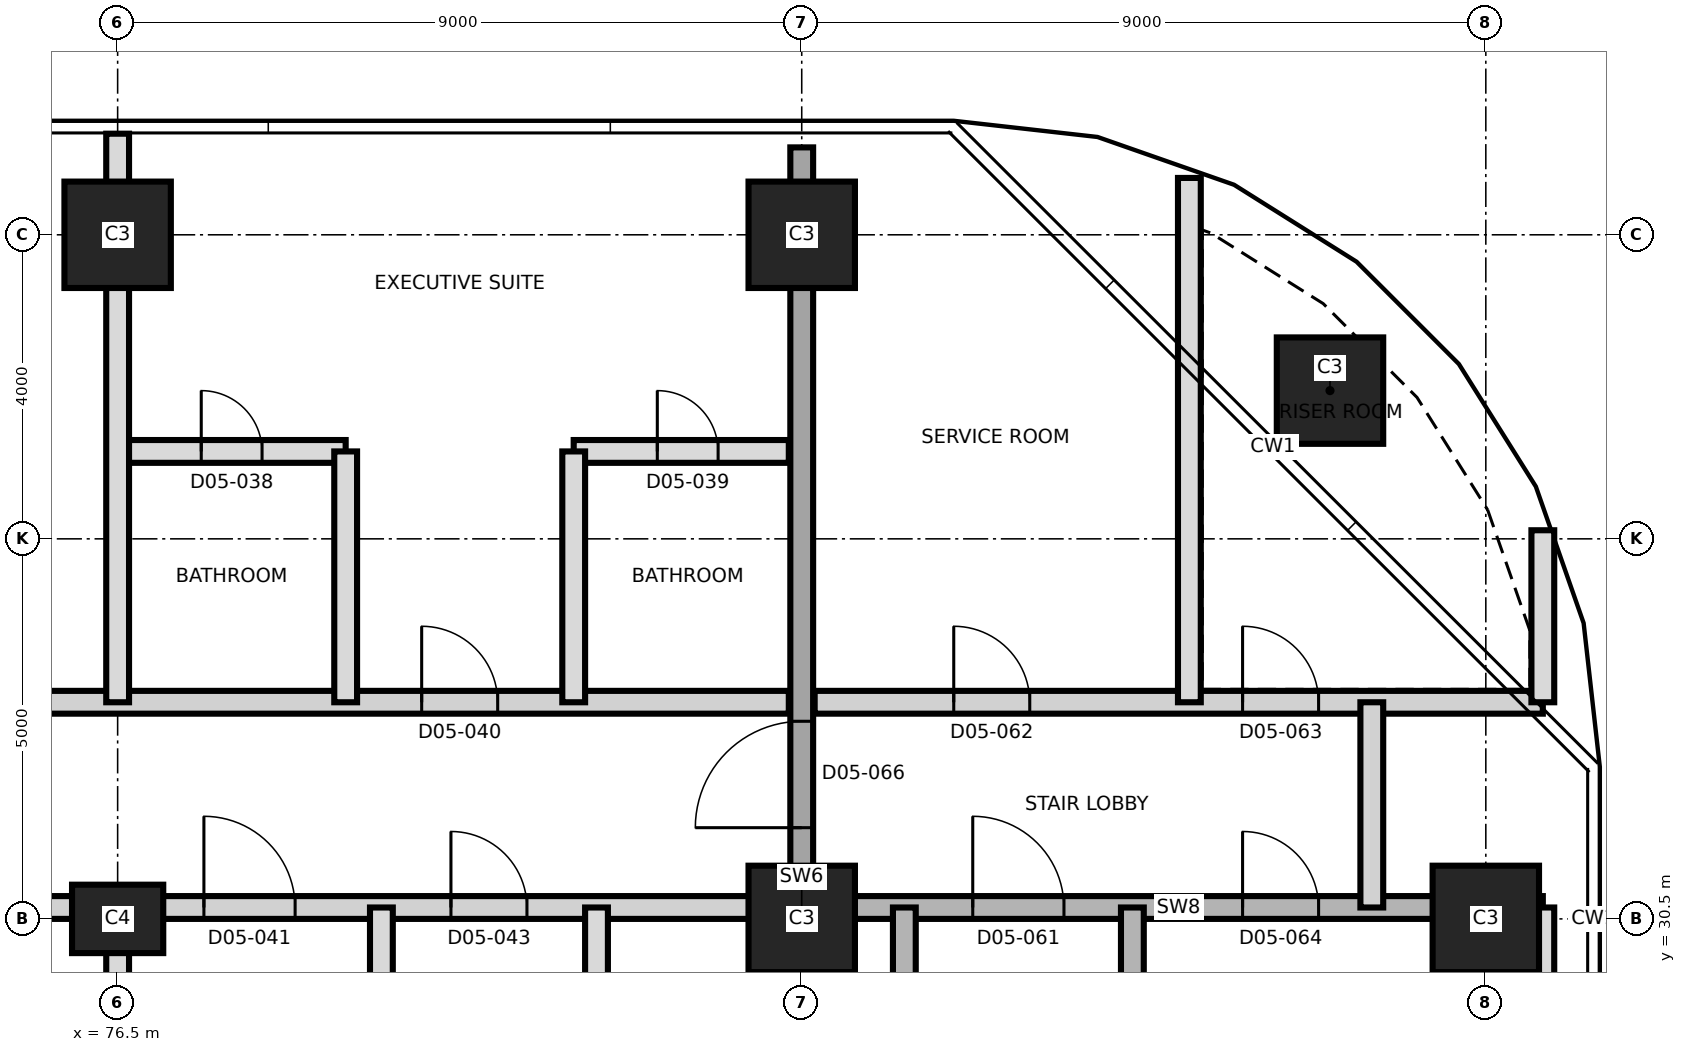
"""IFC4 building model, lengths in metres.
Left out: names, types, materials, properties, quantities, classifications, styles, units other than length and angle.
Written with IfcOpenShell. Run it as: python <this file> out.ifc"""

import sys

from ifc_helpers import new_model, si_unit, direction, frame, frame_2d, origin, origin_2d, place, context, subcontext, project, spatial, rectangle, extrude, element, fill, save


model = new_model("IFC4")
c1 = context("Model", 3, precision=1e-05, world=origin(), true_north=direction((0.0, 1.0)))
c2 = subcontext(c1, "Body", "Model", "MODEL_VIEW")
j1 = project(units=[si_unit("LENGTHUNIT", "METRE"), si_unit("PLANEANGLEUNIT", "RADIAN")], contexts=[c1])
p1 = place(None, origin())
s1 = spatial("IfcSite", under=j1, at=p1, CompositionType="ELEMENT")
p2 = place(p1, origin())
s2 = spatial("IfcBuilding", under=s1, at=p2, CompositionType="ELEMENT")
p3 = place(p2, frame((0.0, 0.0, 70.5)))
s3 = spatial("IfcBuildingStorey", under=s2, at=p3, CompositionType="ELEMENT", Elevation=70.5)
p4 = place(p3, frame((76.5, 30.5, 0.0), z_axis=(0.0, 0.0, 1.0), x_axis=(1.0, 0.0, 0.0)))
e1 = element("IfcColumn", 1, at=p4, inside=s3, PredefinedType="COLUMN", context=c2, shape_type="SweptSolid", body=[
    extrude(rectangle(XDim=1.2, YDim=0.9, at=origin_2d()), origin(), (0.0, 0.0, 1.0), 3.7),
])
for number, where, z_axis, x_axis in (
    (2, (85.5, 30.5, 0.0), (0.0, 0.0, 1.0), (1.0, 0.0, 0.0)),
    (3, (94.5, 30.5, 0.0), (0.0, 0.0, 1.0), (1.0, 0.0, 0.0)),
    (4, (92.45, 37.45, 0.0), (0.0, 0.0, 1.0), (1.0, 0.0, 0.0)),
    (5, (76.5, 39.5, 0.0), (0.0, 0.0, 1.0), (1.0, 0.0, 0.0)),
    (6, (85.5, 39.5, 0.0), (0.0, 0.0, 1.0), (1.0, 0.0, 0.0)),
):
    element("IfcColumn", number, at=place(p3, frame(where, z_axis=z_axis, x_axis=x_axis)), inside=s3, PredefinedType="COLUMN", context=c2, shape_type="SweptSolid", body=[
        extrude(rectangle(XDim=1.4, YDim=1.4, at=origin_2d()), origin(), (0.0, 0.0, 1.0), 3.7),
    ])
p5 = place(p3, frame((85.5, 20.35, 0.0), z_axis=(0.0, 0.0, 1.0), x_axis=(0.0, 1.0, 0.0)))
e7 = element("IfcWall", 7, at=p5, inside=s3, PredefinedType="SHEAR", context=c2, shape_type="SweptSolid", body=[
    extrude(rectangle(XDim=20.3, YDim=0.3, at=frame_2d((10.15, 0.0))), origin(), (0.0, 0.0, 1.0), 3.7),
])
p6 = place(p5, frame((11.35, 0.0, 0.0)))
e8 = element("IfcOpeningElement", 8, at=p6, cuts=e7, PredefinedType="OPENING", context=c2, shape_type="SweptSolid", body=[
    extrude(rectangle(XDim=1.4, YDim=2.1, at=frame_2d((0.7, 1.05))), frame((0.0, 0.16, 0.0), z_axis=(0.0, -1.0, 0.0), x_axis=(1.0, 0.0, 0.0)), (0.0, 0.0, 1.0), 0.32),
])
p7 = place(p3, frame((58.95, 30.65, 0.0), z_axis=(0.0, 0.0, 1.0), x_axis=(1.0, 0.0, 0.0)))
e9 = element("IfcWall", 9, at=p7, inside=s3, PredefinedType="PARTITIONING", context=c2, shape_type="SweptSolid", body=[
    extrude(rectangle(XDim=26.38, YDim=0.3, at=frame_2d((13.19, 0.0))), origin(), (0.0, 0.0, 1.0), 3.4),
])
p8 = place(p7, frame((0.685, 0.0, 0.0)))
e10 = element("IfcOpeningElement", 10, at=p8, cuts=e9, PredefinedType="OPENING", context=c2, shape_type="SweptSolid", body=[
    extrude(rectangle(XDim=1.2, YDim=2.1, at=frame_2d((0.6, 1.05))), frame((0.0, 0.16, 0.0), z_axis=(0.0, -1.0, 0.0), x_axis=(1.0, 0.0, 0.0)), (0.0, 0.0, 1.0), 0.32),
])
p9 = place(p7, frame((3.935, 0.0, 0.0)))
e11 = element("IfcOpeningElement", 11, at=p9, cuts=e9, PredefinedType="OPENING", context=c2, shape_type="SweptSolid", body=[
    extrude(rectangle(XDim=1.0, YDim=2.1, at=frame_2d((0.5, 1.05))), frame((0.0, 0.16, 0.0), z_axis=(0.0, -1.0, 0.0), x_axis=(1.0, 0.0, 0.0)), (0.0, 0.0, 1.0), 0.32),
])
p10 = place(p7, frame((11.965, 0.0, 0.0)))
e12 = element("IfcOpeningElement", 12, at=p10, cuts=e9, PredefinedType="OPENING", context=c2, shape_type="SweptSolid", body=[
    extrude(rectangle(XDim=1.0, YDim=2.1, at=frame_2d((0.5, 1.05))), frame((0.0, 0.16, 0.0), z_axis=(0.0, -1.0, 0.0), x_axis=(1.0, 0.0, 0.0)), (0.0, 0.0, 1.0), 0.32),
])
p11 = place(p7, frame((14.915, 0.0, 0.0)))
e13 = element("IfcOpeningElement", 13, at=p11, cuts=e9, PredefinedType="OPENING", context=c2, shape_type="SweptSolid", body=[
    extrude(rectangle(XDim=1.4, YDim=2.1, at=frame_2d((0.7, 1.05))), frame((0.0, 0.16, 0.0), z_axis=(0.0, -1.0, 0.0), x_axis=(1.0, 0.0, 0.0)), (0.0, 0.0, 1.0), 0.32),
])
p12 = place(p7, frame((18.685, 0.0, 0.0)))
e14 = element("IfcOpeningElement", 14, at=p12, cuts=e9, PredefinedType="OPENING", context=c2, shape_type="SweptSolid", body=[
    extrude(rectangle(XDim=1.2, YDim=2.1, at=frame_2d((0.6, 1.05))), frame((0.0, 0.16, 0.0), z_axis=(0.0, -1.0, 0.0), x_axis=(1.0, 0.0, 0.0)), (0.0, 0.0, 1.0), 0.32),
])
p13 = place(p7, frame((21.935, 0.0, 0.0)))
e15 = element("IfcOpeningElement", 15, at=p13, cuts=e9, PredefinedType="OPENING", context=c2, shape_type="SweptSolid", body=[
    extrude(rectangle(XDim=1.0, YDim=2.1, at=frame_2d((0.5, 1.05))), frame((0.0, 0.16, 0.0), z_axis=(0.0, -1.0, 0.0), x_axis=(1.0, 0.0, 0.0)), (0.0, 0.0, 1.0), 0.32),
])
p14 = place(p3, frame((85.67, 30.65, 0.0), z_axis=(0.0, 0.0, 1.0), x_axis=(1.0, 0.0, 0.0)))
e16 = element("IfcWall", 16, at=p14, inside=s3, PredefinedType="SHEAR", context=c2, shape_type="SweptSolid", body=[
    extrude(rectangle(XDim=9.58, YDim=0.3, at=frame_2d((4.79, 0.0))), origin(), (0.0, 0.0, 1.0), 3.4),
])
p15 = place(p14, frame((2.08, 0.0, 0.0)))
e17 = element("IfcOpeningElement", 17, at=p15, cuts=e16, PredefinedType="OPENING", context=c2, shape_type="SweptSolid", body=[
    extrude(rectangle(XDim=1.2, YDim=2.1, at=frame_2d((0.6, 1.05))), frame((0.0, 0.16, 0.0), z_axis=(0.0, -1.0, 0.0), x_axis=(1.0, 0.0, 0.0)), (0.0, 0.0, 1.0), 0.32),
])
p16 = place(p14, frame((5.63, 0.0, 0.0)))
e18 = element("IfcOpeningElement", 18, at=p16, cuts=e16, PredefinedType="OPENING", context=c2, shape_type="SweptSolid", body=[
    extrude(rectangle(XDim=1.0, YDim=2.1, at=frame_2d((0.5, 1.05))), frame((0.0, 0.16, 0.0), z_axis=(0.0, -1.0, 0.0), x_axis=(1.0, 0.0, 0.0)), (0.0, 0.0, 1.0), 0.32),
])
p17 = place(p3, frame((58.95, 33.35, 0.0), z_axis=(0.0, 0.0, 1.0), x_axis=(1.0, 0.0, 0.0)))
e19 = element("IfcWall", 19, at=p17, inside=s3, PredefinedType="PARTITIONING", context=c2, shape_type="SweptSolid", body=[
    extrude(rectangle(XDim=26.38, YDim=0.3, at=frame_2d((13.19, 0.0))), origin(), (0.0, 0.0, 1.0), 3.4),
])
p18 = place(p17, frame((0.685, 0.0, 0.0)))
e20 = element("IfcOpeningElement", 20, at=p18, cuts=e19, PredefinedType="OPENING", context=c2, shape_type="SweptSolid", body=[
    extrude(rectangle(XDim=1.2, YDim=2.1, at=frame_2d((0.6, 1.05))), frame((0.0, 0.16, 0.0), z_axis=(0.0, -1.0, 0.0), x_axis=(1.0, 0.0, 0.0)), (0.0, 0.0, 1.0), 0.32),
])
p19 = place(p17, frame((3.935, 0.0, 0.0)))
e21 = element("IfcOpeningElement", 21, at=p19, cuts=e19, PredefinedType="OPENING", context=c2, shape_type="SweptSolid", body=[
    extrude(rectangle(XDim=1.0, YDim=2.1, at=frame_2d((0.5, 1.05))), frame((0.0, 0.16, 0.0), z_axis=(0.0, -1.0, 0.0), x_axis=(1.0, 0.0, 0.0)), (0.0, 0.0, 1.0), 0.32),
])
p20 = place(p17, frame((9.58, 0.0, 0.0)))
e22 = element("IfcOpeningElement", 22, at=p20, cuts=e19, PredefinedType="OPENING", context=c2, shape_type="SweptSolid", body=[
    extrude(rectangle(XDim=1.0, YDim=2.1, at=frame_2d((0.5, 1.05))), frame((0.0, 0.16, 0.0), z_axis=(0.0, -1.0, 0.0), x_axis=(1.0, 0.0, 0.0)), (0.0, 0.0, 1.0), 0.32),
])
p21 = place(p17, frame((15.43, 0.0, 0.0)))
e23 = element("IfcOpeningElement", 23, at=p21, cuts=e19, PredefinedType="OPENING", context=c2, shape_type="SweptSolid", body=[
    extrude(rectangle(XDim=1.0, YDim=2.1, at=frame_2d((0.5, 1.05))), frame((0.0, 0.16, 0.0), z_axis=(0.0, -1.0, 0.0), x_axis=(1.0, 0.0, 0.0)), (0.0, 0.0, 1.0), 0.32),
])
p22 = place(p17, frame((21.55, 0.0, 0.0)))
e24 = element("IfcOpeningElement", 24, at=p22, cuts=e19, PredefinedType="OPENING", context=c2, shape_type="SweptSolid", body=[
    extrude(rectangle(XDim=1.0, YDim=2.4, at=frame_2d((0.5, 1.2))), frame((0.0, 0.16, 0.0), z_axis=(0.0, -1.0, 0.0), x_axis=(1.0, 0.0, 0.0)), (0.0, 0.0, 1.0), 0.32),
])
p23 = place(p3, frame((85.67, 33.35, 0.0), z_axis=(0.0, 0.0, 1.0), x_axis=(1.0, 0.0, 0.0)))
e25 = element("IfcWall", 25, at=p23, inside=s3, PredefinedType="PARTITIONING", context=c2, shape_type="SweptSolid", body=[
    extrude(rectangle(XDim=9.58, YDim=0.3, at=frame_2d((4.79, 0.0))), origin(), (0.0, 0.0, 1.0), 3.4),
])
p24 = place(p23, frame((1.83, 0.0, 0.0)))
e26 = element("IfcOpeningElement", 26, at=p24, cuts=e25, PredefinedType="OPENING", context=c2, shape_type="SweptSolid", body=[
    extrude(rectangle(XDim=1.0, YDim=2.1, at=frame_2d((0.5, 1.05))), frame((0.0, 0.16, 0.0), z_axis=(0.0, -1.0, 0.0), x_axis=(1.0, 0.0, 0.0)), (0.0, 0.0, 1.0), 0.32),
])
p25 = place(p23, frame((5.63, 0.0, 0.0)))
e27 = element("IfcOpeningElement", 27, at=p25, cuts=e25, PredefinedType="OPENING", context=c2, shape_type="SweptSolid", body=[
    extrude(rectangle(XDim=1.0, YDim=2.1, at=frame_2d((0.5, 1.05))), frame((0.0, 0.16, 0.0), z_axis=(0.0, -1.0, 0.0), x_axis=(1.0, 0.0, 0.0)), (0.0, 0.0, 1.0), 0.32),
])
p26 = place(p3, frame((76.5, 36.65, 0.0), z_axis=(0.0, 0.0, 1.0), x_axis=(1.0, 0.0, 0.0)))
e28 = element("IfcWall", 28, at=p26, inside=s3, PredefinedType="PARTITIONING", context=c2, shape_type="SweptSolid", body=[
    extrude(rectangle(XDim=3.0, YDim=0.3, at=frame_2d((1.5, 0.0))), origin(), (0.0, 0.0, 1.0), 3.4),
])
p27 = place(p26, frame((1.1, 0.0, 0.0)))
e29 = element("IfcOpeningElement", 29, at=p27, cuts=e28, PredefinedType="OPENING", context=c2, shape_type="SweptSolid", body=[
    extrude(rectangle(XDim=0.8, YDim=2.1, at=frame_2d((0.4, 1.05))), frame((0.0, 0.16, 0.0), z_axis=(0.0, -1.0, 0.0), x_axis=(1.0, 0.0, 0.0)), (0.0, 0.0, 1.0), 0.32),
])
p28 = place(p3, frame((82.5, 36.65, 0.0), z_axis=(0.0, 0.0, 1.0), x_axis=(1.0, 0.0, 0.0)))
e30 = element("IfcWall", 30, at=p28, inside=s3, PredefinedType="PARTITIONING", context=c2, shape_type="SweptSolid", body=[
    extrude(rectangle(XDim=2.83, YDim=0.3, at=frame_2d((1.415, 0.0))), origin(), (0.0, 0.0, 1.0), 3.4),
])
p29 = place(p28, frame((1.1, 0.0, 0.0)))
e31 = element("IfcOpeningElement", 31, at=p29, cuts=e30, PredefinedType="OPENING", context=c2, shape_type="SweptSolid", body=[
    extrude(rectangle(XDim=0.8, YDim=2.1, at=frame_2d((0.4, 1.05))), frame((0.0, 0.16, 0.0), z_axis=(0.0, -1.0, 0.0), x_axis=(1.0, 0.0, 0.0)), (0.0, 0.0, 1.0), 0.32),
])
p30 = place(p3, frame((76.5, 20.35, 0.0), z_axis=(0.0, 0.0, 1.0), x_axis=(0.0, 1.0, 0.0)))
e32 = element("IfcWall", 32, at=p30, inside=s3, PredefinedType="PARTITIONING", context=c2, shape_type="SweptSolid", body=[
    extrude(rectangle(XDim=10.3, YDim=0.3, at=frame_2d((5.15, 0.0))), origin(), (0.0, 0.0, 1.0), 3.4),
])
p31 = place(p3, frame((76.5, 33.35, 0.0), z_axis=(0.0, 0.0, 1.0), x_axis=(0.0, 1.0, 0.0)))
e33 = element("IfcWall", 33, at=p31, inside=s3, PredefinedType="PARTITIONING", context=c2, shape_type="SweptSolid", body=[
    extrude(rectangle(XDim=7.48, YDim=0.3, at=frame_2d((3.74, 0.0))), origin(), (0.0, 0.0, 1.0), 3.4),
])
p32 = place(p3, frame((79.5, 33.35, 0.0), z_axis=(0.0, 0.0, 1.0), x_axis=(0.0, 1.0, 0.0)))
e34 = element("IfcWall", 34, at=p32, inside=s3, PredefinedType="PARTITIONING", context=c2, shape_type="SweptSolid", body=[
    extrude(rectangle(XDim=3.3, YDim=0.3, at=frame_2d((1.65, 0.0))), origin(), (0.0, 0.0, 1.0), 3.4),
])
p33 = place(p3, frame((79.97, 20.35, 0.0), z_axis=(0.0, 0.0, 1.0), x_axis=(0.0, 1.0, 0.0)))
e35 = element("IfcWall", 35, at=p33, inside=s3, PredefinedType="PARTITIONING", context=c2, shape_type="SweptSolid", body=[
    extrude(rectangle(XDim=10.3, YDim=0.3, at=frame_2d((5.15, 0.0))), origin(), (0.0, 0.0, 1.0), 3.4),
])
p34 = place(p3, frame((82.5, 33.35, 0.0), z_axis=(0.0, 0.0, 1.0), x_axis=(0.0, 1.0, 0.0)))
e36 = element("IfcWall", 36, at=p34, inside=s3, PredefinedType="PARTITIONING", context=c2, shape_type="SweptSolid", body=[
    extrude(rectangle(XDim=3.3, YDim=0.3, at=frame_2d((1.65, 0.0))), origin(), (0.0, 0.0, 1.0), 3.4),
])
p35 = place(p3, frame((82.8, 27.45, 0.0), z_axis=(0.0, 0.0, 1.0), x_axis=(0.0, 1.0, 0.0)))
e37 = element("IfcWall", 37, at=p35, inside=s3, PredefinedType="PARTITIONING", context=c2, shape_type="SweptSolid", body=[
    extrude(rectangle(XDim=3.2, YDim=0.3, at=frame_2d((1.6, 0.0))), origin(), (0.0, 0.0, 1.0), 3.4),
])
for number, where, z_axis, x_axis in (
    (38, (86.85, 21.8, 0.0), (0.0, 0.0, 1.0), (0.0, 1.0, 0.0)),
    (39, (89.85, 21.8, 0.0), (0.0, 0.0, 1.0), (0.0, 1.0, 0.0)),
):
    element("IfcWall", number, at=place(p3, frame(where, z_axis=z_axis, x_axis=x_axis)), inside=s3, PredefinedType="SHEAR", context=c2, shape_type="SweptSolid", body=[
        extrude(rectangle(XDim=8.85, YDim=0.3, at=frame_2d((4.425, 0.0))), origin(), (0.0, 0.0, 1.0), 3.4),
    ])
p36 = place(p3, frame((90.6, 33.35, 0.0), z_axis=(0.0, 0.0, 1.0), x_axis=(0.0, 1.0, 0.0)))
e40 = element("IfcWall", 40, at=p36, inside=s3, PredefinedType="PARTITIONING", context=c2, shape_type="SweptSolid", body=[
    extrude(rectangle(XDim=6.898, YDim=0.3, at=frame_2d((3.449, 0.0))), origin(), (0.0, 0.0, 1.0), 3.4),
])
p37 = place(p3, frame((93.0, 30.65, 0.0), z_axis=(0.0, 0.0, 1.0), x_axis=(0.0, 1.0, 0.0)))
e41 = element("IfcWall", 41, at=p37, inside=s3, PredefinedType="PARTITIONING", context=c2, shape_type="SweptSolid", body=[
    extrude(rectangle(XDim=2.7, YDim=0.3, at=frame_2d((1.35, 0.0))), origin(), (0.0, 0.0, 1.0), 3.4),
])
p38 = place(p3, frame((95.25, 25.387, 0.0), z_axis=(0.0, 0.0, 1.0), x_axis=(0.0, 1.0, 0.0)))
e42 = element("IfcWall", 42, at=p38, inside=s3, PredefinedType="PARTITIONING", context=c2, shape_type="SweptSolid", body=[
    extrude(rectangle(XDim=5.263, YDim=0.3, at=frame_2d((2.631, 0.0))), origin(), (0.0, 0.0, 1.0), 3.4),
])
p39 = place(p3, frame((95.25, 33.35, 0.0), z_axis=(0.0, 0.0, 1.0), x_axis=(0.0, 1.0, 0.0)))
e43 = element("IfcWall", 43, at=p39, inside=s3, PredefinedType="PARTITIONING", context=c2, shape_type="SweptSolid", body=[
    extrude(rectangle(XDim=2.263, YDim=0.3, at=frame_2d((1.131, 0.0))), origin(), (0.0, 0.0, 1.0), 3.4),
])
p40 = place(p27, origin())
e44 = element("IfcDoor", 44, at=p40, inside=s3, OperationType="SINGLE_SWING_LEFT", PredefinedType="DOOR", context=c2, shape_type="SweptSolid", body=[
    extrude(rectangle(XDim=0.8, YDim=2.1, at=frame_2d((0.4, 1.05))), frame((0.0, 0.025, 0.0), z_axis=(0.0, -1.0, 0.0), x_axis=(1.0, 0.0, 0.0)), (0.0, 0.0, 1.0), 0.05),
])
fill(e29, e44)
p41 = place(p29, origin())
e45 = element("IfcDoor", 45, at=p41, inside=s3, OperationType="SINGLE_SWING_RIGHT", PredefinedType="DOOR", context=c2, shape_type="SweptSolid", body=[
    extrude(rectangle(XDim=0.8, YDim=2.1, at=frame_2d((0.4, 1.05))), frame((0.0, 0.025, 0.0), z_axis=(0.0, -1.0, 0.0), x_axis=(1.0, 0.0, 0.0)), (0.0, 0.0, 1.0), 0.05),
])
fill(e31, e45)
p42 = place(p22, origin())
e46 = element("IfcDoor", 46, at=p42, inside=s3, OperationType="SINGLE_SWING_LEFT", PredefinedType="DOOR", context=c2, shape_type="SweptSolid", body=[
    extrude(rectangle(XDim=1.0, YDim=2.4, at=frame_2d((0.5, 1.2))), frame((0.0, 0.025, 0.0), z_axis=(0.0, -1.0, 0.0), x_axis=(1.0, 0.0, 0.0)), (0.0, 0.0, 1.0), 0.05),
])
fill(e24, e46)
p43 = place(p12, origin())
e47 = element("IfcDoor", 47, at=p43, inside=s3, OperationType="SINGLE_SWING_LEFT", PredefinedType="DOOR", context=c2, shape_type="SweptSolid", body=[
    extrude(rectangle(XDim=1.2, YDim=2.1, at=frame_2d((0.6, 1.05))), frame((0.0, 0.025, 0.0), z_axis=(0.0, -1.0, 0.0), x_axis=(1.0, 0.0, 0.0)), (0.0, 0.0, 1.0), 0.05),
])
fill(e14, e47)
p44 = place(p13, origin())
e48 = element("IfcDoor", 48, at=p44, inside=s3, OperationType="SINGLE_SWING_LEFT", PredefinedType="DOOR", context=c2, shape_type="SweptSolid", body=[
    extrude(rectangle(XDim=1.0, YDim=2.1, at=frame_2d((0.5, 1.05))), frame((0.0, 0.025, 0.0), z_axis=(0.0, -1.0, 0.0), x_axis=(1.0, 0.0, 0.0)), (0.0, 0.0, 1.0), 0.05),
])
fill(e15, e48)
p45 = place(p15, origin())
e49 = element("IfcDoor", 49, at=p45, inside=s3, OperationType="SINGLE_SWING_LEFT", PredefinedType="DOOR", context=c2, shape_type="SweptSolid", body=[
    extrude(rectangle(XDim=1.2, YDim=2.1, at=frame_2d((0.6, 1.05))), frame((0.0, 0.025, 0.0), z_axis=(0.0, -1.0, 0.0), x_axis=(1.0, 0.0, 0.0)), (0.0, 0.0, 1.0), 0.05),
])
fill(e17, e49)
p46 = place(p24, origin())
e50 = element("IfcDoor", 50, at=p46, inside=s3, OperationType="SINGLE_SWING_LEFT", PredefinedType="DOOR", context=c2, shape_type="SweptSolid", body=[
    extrude(rectangle(XDim=1.0, YDim=2.1, at=frame_2d((0.5, 1.05))), frame((0.0, 0.025, 0.0), z_axis=(0.0, -1.0, 0.0), x_axis=(1.0, 0.0, 0.0)), (0.0, 0.0, 1.0), 0.05),
])
fill(e26, e50)
p47 = place(p25, origin())
e51 = element("IfcDoor", 51, at=p47, inside=s3, OperationType="SINGLE_SWING_RIGHT", PredefinedType="DOOR", context=c2, shape_type="SweptSolid", body=[
    extrude(rectangle(XDim=1.0, YDim=2.1, at=frame_2d((0.5, 1.05))), frame((0.0, 0.025, 0.0), z_axis=(0.0, -1.0, 0.0), x_axis=(1.0, 0.0, 0.0)), (0.0, 0.0, 1.0), 0.05),
])
fill(e27, e51)
p48 = place(p16, origin())
e52 = element("IfcDoor", 52, at=p48, inside=s3, OperationType="SINGLE_SWING_LEFT", PredefinedType="DOOR", context=c2, shape_type="SweptSolid", body=[
    extrude(rectangle(XDim=1.0, YDim=2.1, at=frame_2d((0.5, 1.05))), frame((0.0, 0.025, 0.0), z_axis=(0.0, -1.0, 0.0), x_axis=(1.0, 0.0, 0.0)), (0.0, 0.0, 1.0), 0.05),
])
fill(e18, e52)
p49 = place(p6, origin())
e53 = element("IfcDoor", 53, at=p49, inside=s3, OperationType="SINGLE_SWING_RIGHT", PredefinedType="DOOR", context=c2, shape_type="SweptSolid", body=[
    extrude(rectangle(XDim=1.4, YDim=2.1, at=frame_2d((0.7, 1.05))), frame((0.0, 0.025, 0.0), z_axis=(0.0, -1.0, 0.0), x_axis=(1.0, 0.0, 0.0)), (0.0, 0.0, 1.0), 0.05),
])
fill(e8, e53)
save(model, sys.argv[1])
